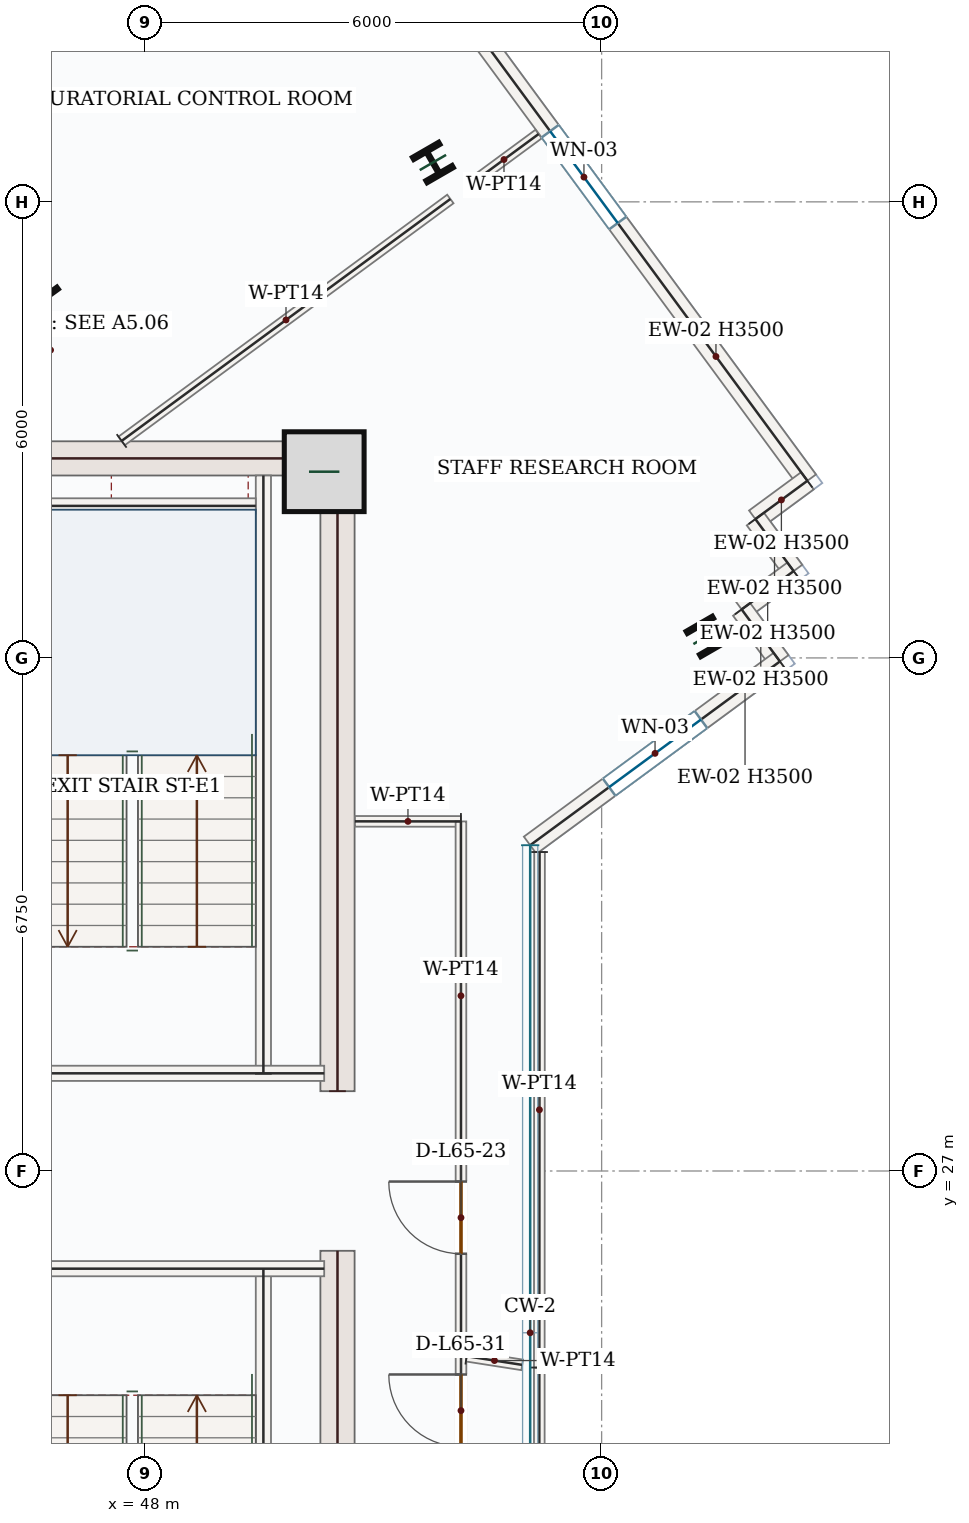
"""IFC4 building model, lengths in metres.
Left out: names, types, materials, properties, quantities, classifications, styles, units other than length and angle.
Written with IfcOpenShell. Run it as: python <this file> out.ifc"""

import sys

from ifc_helpers import new_model, si_unit, direction, frame, frame_2d, origin, origin_2d, place, context, subcontext, project, spatial, rectangle, i_section, extrude, source, transform, mapped, element, fill, save


model = new_model("IFC4")
c1 = context("Model", 3, precision=1e-05, world=origin(), true_north=direction((0.0, 1.0)))
c2 = subcontext(c1, "Body", "Model", "MODEL_VIEW")
j1 = project(units=[si_unit("LENGTHUNIT", "METRE"), si_unit("PLANEANGLEUNIT", "RADIAN")], contexts=[c1])
p1 = place(None, origin())
s1 = spatial("IfcSite", under=j1, at=p1, CompositionType="ELEMENT")
p2 = place(p1, origin())
s2 = spatial("IfcBuilding", under=s1, at=p2, CompositionType="ELEMENT")
p3 = place(p2, frame((0.0, 0.0, 272.85)))
s3 = spatial("IfcBuildingStorey", under=s2, at=p3, CompositionType="ELEMENT", Elevation=272.85)
m1 = source(origin(), c2, "Body", "SweptSolid", [
    extrude(rectangle(XDim=8.55, YDim=0.45, at=frame_2d((4.275, 0.0))), origin(), (0.0, 0.0, 1.0), 3.5),
])
for number, where, z_axis, x_axis in (
    (1, (50.525, 17.4, 0.0), (0.0, 0.0, 1.0), (0.0, 1.0, 0.0)),
    (2, (50.525, 28.05, 0.0), (0.0, 0.0, 1.0), (0.0, 1.0, 0.0)),
):
    element("IfcWall", number, at=place(p3, frame(where, z_axis=z_axis, x_axis=x_axis)), inside=s3, PredefinedType="SHEAR", context=c2, shape_type="MappedRepresentation", body=[
        mapped(m1, transform((0.0, 0.0, 0.0), x_axis=(1.0, 0.0, 0.0), y_axis=(0.0, 1.0, 0.0), z_axis=(0.0, 0.0, 1.0), scale=1.0)),
    ])
m2 = source(origin(), c2, "Body", "SweptSolid", [
    extrude(rectangle(XDim=7.1, YDim=0.45, at=frame_2d((3.55, 0.0))), origin(), (0.0, 0.0, 1.0), 3.5),
])
p4 = place(p3, frame((43.2, 36.375, 0.0), z_axis=(0.0, 0.0, 1.0), x_axis=(1.0, 0.0, 0.0)))
e3 = element("IfcWall", 3, at=p4, inside=s3, PredefinedType="SHEAR", context=c2, shape_type="MappedRepresentation", body=[
    mapped(m2, transform((0.0, 0.0, 0.0), x_axis=(1.0, 0.0, 0.0), y_axis=(0.0, 1.0, 0.0), z_axis=(0.0, 0.0, 1.0), scale=1.0)),
])
m3 = source(origin(), c2, "Body", "SweptSolid", [
    extrude(rectangle(XDim=1.05, YDim=1.05, at=origin_2d()), origin(), (0.0, 0.0, 1.0), 3.75),
])
p5 = place(p3, frame((50.35, 36.2, 0.0), z_axis=(0.0, 0.0, 1.0), x_axis=(1.0, 0.0, 0.0)))
e4 = element("IfcColumn", 4, at=p5, inside=s3, PredefinedType="COLUMN", context=c2, shape_type="MappedRepresentation", body=[
    mapped(m3, transform((0.0, 0.0, 0.0), x_axis=(1.0, 0.0, 0.0), y_axis=(0.0, 1.0, 0.0), z_axis=(0.0, 0.0, 1.0), scale=1.0)),
])
m4 = source(origin(), c2, "Body", "SweptSolid", [
    extrude(i_section(OverallWidth=0.399, OverallDepth=0.386, WebThickness=0.021, FlangeThickness=0.033, FilletRadius=0.018, at=origin_2d()), origin(), (0.0, 0.0, 1.0), 3.75),
])
for number, where, z_axis, x_axis in (
    (5, (46.578, 38.641, 0.0), (0.0, 0.0, 1.0), (0.809, 0.588, 0.0)),
    (6, (55.38, 34.032, 0.0), (0.0, 0.0, 1.0), (0.866, 0.5, 0.0)),
    (7, (51.78, 40.268, 0.0), (0.0, 0.0, 1.0), (0.866, 0.5, 0.0)),
):
    element("IfcColumn", number, at=place(p3, frame(where, z_axis=z_axis, x_axis=x_axis)), inside=s3, PredefinedType="COLUMN", context=c2, shape_type="MappedRepresentation", body=[
        mapped(m4, transform((0.0, 0.0, 0.0), x_axis=(1.0, 0.0, 0.0), y_axis=(0.0, 1.0, 0.0), z_axis=(0.0, 0.0, 1.0), scale=1.0)),
    ])
p6 = place(p3, frame((41.423, 39.26, 0.0), z_axis=(0.0, 0.0, 1.0), x_axis=(0.805403112922, 0.592727446383, 0.0)))
e8 = element("IfcWall", 8, at=p6, inside=s3, PredefinedType="SOLIDWALL", context=c2, shape_type="SweptSolid", body=[
    extrude(rectangle(XDim=8.726, YDim=0.28, at=frame_2d((4.363, 0.0))), origin(), (0.0, 0.0, 1.0), 3.5),
])
p7 = place(p6, frame((2.917, 0.0, 0.0)))
e9 = element("IfcOpeningElement", 9, at=p7, cuts=e8, PredefinedType="OPENING", context=c2, shape_type="SweptSolid", body=[
    extrude(rectangle(XDim=1.05, YDim=2.15, at=frame_2d((0.525, 1.075))), frame((0.0, 0.15, 0.0), z_axis=(0.0, -1.0, 0.0), x_axis=(1.0, 0.0, 0.0)), (0.0, 0.0, 1.0), 0.3),
])
p8 = place(p3, frame((50.827, 44.07, 0.0), z_axis=(0.0, 0.0, 1.0), x_axis=(0.592722097771, -0.805407049146, 0.0)))
e10 = element("IfcWall", 10, at=p8, inside=s3, PredefinedType="SOLIDWALL", context=c2, shape_type="SweptSolid", body=[
    extrude(rectangle(XDim=9.92, YDim=0.28, at=frame_2d((4.96, 0.0))), origin(), (0.0, 0.0, 1.0), 3.5),
])
p9 = place(p8, frame((4.21, 0.0, 0.85)))
e11 = element("IfcOpeningElement", 11, at=p9, cuts=e10, PredefinedType="OPENING", context=c2, shape_type="SweptSolid", body=[
    extrude(rectangle(XDim=1.5, YDim=1.5, at=frame_2d((0.75, 0.75))), frame((0.0, 0.15, 0.0), z_axis=(0.0, -1.0, 0.0), x_axis=(1.0, 0.0, 0.0)), (0.0, 0.0, 1.0), 0.3),
])
m5 = source(origin(), c2, "Body", "SweptSolid", [
    extrude(rectangle(XDim=0.85, YDim=0.28, at=frame_2d((0.425, 0.0))), origin(), (0.0, 0.0, 1.0), 3.5),
])
for number, where, z_axis, x_axis in (
    (12, (56.707, 36.081, 0.0), (0.0, 0.0, 1.0), (-0.805, -0.593, 0.0)),
    (13, (56.023, 35.577, 0.0), (0.0, 0.0, 1.0), (0.593, -0.805, 0.0)),
):
    element("IfcWall", number, at=place(p3, frame(where, z_axis=z_axis, x_axis=x_axis)), inside=s3, PredefinedType="SOLIDWALL", context=c2, shape_type="MappedRepresentation", body=[
        mapped(m5, transform((0.0, 0.0, 0.0), x_axis=(1.0, 0.0, 0.0), y_axis=(0.0, 1.0, 0.0), z_axis=(0.0, 0.0, 1.0), scale=1.0)),
    ])
m6 = source(origin(), c2, "Body", "SweptSolid", [
    extrude(rectangle(XDim=0.85, YDim=0.28, at=frame_2d((0.425, 0.0))), origin(), (0.0, 0.0, 1.0), 3.5),
])
p10 = place(p3, frame((56.527, 34.892, 0.0), z_axis=(0.0, 0.0, 1.0), x_axis=(-0.805445398986, -0.592669983425, 0.0)))
e14 = element("IfcWall", 14, at=p10, inside=s3, PredefinedType="SOLIDWALL", context=c2, shape_type="MappedRepresentation", body=[
    mapped(m6, transform((0.0, 0.0, 0.0), x_axis=(1.0, 0.0, 0.0), y_axis=(0.0, 1.0, 0.0), z_axis=(0.0, 0.0, 1.0), scale=1.0)),
])
p11 = place(p3, frame((55.842, 34.388, 0.0), z_axis=(0.0, 0.0, 1.0), x_axis=(0.592807079659, -0.80534450163, 0.0)))
e15 = element("IfcWall", 15, at=p11, inside=s3, PredefinedType="SOLIDWALL", context=c2, shape_type="MappedRepresentation", body=[
    mapped(m5, transform((0.0, 0.0, 0.0), x_axis=(1.0, 0.0, 0.0), y_axis=(0.0, 1.0, 0.0), z_axis=(0.0, 0.0, 1.0), scale=1.0)),
])
p12 = place(p3, frame((56.346, 33.704, 0.0), z_axis=(0.0, 0.0, 1.0), x_axis=(-0.805410687764, -0.592717153486, 0.0)))
e16 = element("IfcWall", 16, at=p12, inside=s3, PredefinedType="SOLIDWALL", context=c2, shape_type="SweptSolid", body=[
    extrude(rectangle(XDim=4.079, YDim=0.28, at=frame_2d((2.04, 0.0))), origin(), (0.0, 0.0, 1.0), 3.5),
])
p13 = place(p12, frame((1.29, 0.0, 0.85)))
e17 = element("IfcOpeningElement", 17, at=p13, cuts=e16, PredefinedType="OPENING", context=c2, shape_type="SweptSolid", body=[
    extrude(rectangle(XDim=1.5, YDim=1.5, at=frame_2d((0.75, 0.75))), frame((0.0, 0.15, 0.0), z_axis=(0.0, -1.0, 0.0), x_axis=(1.0, 0.0, 0.0)), (0.0, 0.0, 1.0), 0.3),
])
m7 = source(origin(), c2, "Body", "SweptSolid", [
    extrude(rectangle(XDim=7.87, YDim=0.2, at=frame_2d((3.935, 0.0))), origin(), (0.0, 0.0, 1.0), 3.5),
])
for number, where, z_axis, x_axis in (
    (18, (49.55, 17.85, 0.0), (0.0, 0.0, 1.0), (0.0, 1.0, 0.0)),
    (19, (49.55, 28.28, 0.0), (0.0, 0.0, 1.0), (0.0, 1.0, 0.0)),
):
    element("IfcWall", number, at=place(p3, frame(where, z_axis=z_axis, x_axis=x_axis)), inside=s3, PredefinedType="SOLIDWALL", context=c2, shape_type="MappedRepresentation", body=[
        mapped(m7, transform((0.0, 0.0, 0.0), x_axis=(1.0, 0.0, 0.0), y_axis=(0.0, 1.0, 0.0), z_axis=(0.0, 0.0, 1.0), scale=1.0)),
    ])
m8 = source(origin(), c2, "Body", "SweptSolid", [
    extrude(rectangle(XDim=4.25, YDim=0.2, at=frame_2d((2.125, 0.0))), origin(), (0.0, 0.0, 1.0), 3.5),
])
for number, where, z_axis, x_axis in (
    (20, (46.1, 25.715, 0.0), (0.0, 0.0, 1.0), (1.0, 0.0, 0.0)),
    (21, (46.1, 28.285, 0.0), (0.0, 0.0, 1.0), (1.0, 0.0, 0.0)),
):
    element("IfcWall", number, at=place(p3, frame(where, z_axis=z_axis, x_axis=x_axis)), inside=s3, PredefinedType="SOLIDWALL", context=c2, shape_type="MappedRepresentation", body=[
        mapped(m8, transform((0.0, 0.0, 0.0), x_axis=(1.0, 0.0, 0.0), y_axis=(0.0, 1.0, 0.0), z_axis=(0.0, 0.0, 1.0), scale=1.0)),
    ])
m9 = source(origin(), c2, "Body", "SweptSolid", [
    extrude(rectangle(XDim=3.25, YDim=0.2, at=frame_2d((1.625, 0.0))), origin(), (0.0, 0.0, 1.0), 3.5),
])
p14 = place(p3, frame((46.2, 35.75, 0.0), z_axis=(0.0, 0.0, 1.0), x_axis=(1.0, 0.0, 0.0)))
e22 = element("IfcWall", 22, at=p14, inside=s3, PredefinedType="SOLIDWALL", context=c2, shape_type="MappedRepresentation", body=[
    mapped(m9, transform((0.0, 0.0, 0.0), x_axis=(1.0, 0.0, 0.0), y_axis=(0.0, 1.0, 0.0), z_axis=(0.0, 0.0, 1.0), scale=1.0)),
])
p15 = place(p3, frame((52.149, 22.478, 0.0), z_axis=(0.0, 0.0, 1.0), x_axis=(0.000465766135, 0.999999891531, 0.0)))
e23 = element("IfcWall", 23, at=p15, inside=s3, PredefinedType="PARTITIONING", context=c2, shape_type="SweptSolid", body=[
    extrude(rectangle(XDim=2.097, YDim=0.14, at=frame_2d((1.048, 0.0))), origin(), (0.0, 0.0, 1.0), 3.5),
])
p16 = place(p15, frame((0.894, 0.0, 0.0)))
e24 = element("IfcOpeningElement", 24, at=p16, cuts=e23, PredefinedType="OPENING", context=c2, shape_type="SweptSolid", body=[
    extrude(rectangle(XDim=0.95, YDim=2.15, at=frame_2d((0.475, 1.075))), frame((0.0, 0.08, 0.0), z_axis=(0.0, -1.0, 0.0), x_axis=(1.0, 0.0, 0.0)), (0.0, 0.0, 1.0), 0.16),
])
m10 = source(origin(), c2, "Body", "SweptSolid", [
    extrude(rectangle(XDim=0.739, YDim=0.14, at=frame_2d((0.369, 0.0))), origin(), (0.0, 0.0, 1.0), 3.5),
])
p17 = place(p3, frame((52.225, 24.563, 0.0), z_axis=(0.0, 0.0, 1.0), x_axis=(0.988021482099, -0.154316398709, 0.0)))
e25 = element("IfcWall", 25, at=p17, inside=s3, PredefinedType="PARTITIONING", context=c2, shape_type="MappedRepresentation", body=[
    mapped(m10, transform((0.0, 0.0, 0.0), x_axis=(1.0, 0.0, 0.0), y_axis=(0.0, 1.0, 0.0), z_axis=(0.0, 0.0, 1.0), scale=1.0)),
])
m11 = source(origin(), c2, "Body", "SweptSolid", [
    extrude(rectangle(XDim=6.006, YDim=0.14, at=frame_2d((3.003, 0.0))), origin(), (0.0, 0.0, 1.0), 3.5),
])
p18 = place(p3, frame((53.18, 24.414, 0.0), z_axis=(0.0, 0.0, 1.0), x_axis=(0.0, -1.0, 0.0)))
e26 = element("IfcWall", 26, at=p18, inside=s3, PredefinedType="PARTITIONING", context=c2, shape_type="MappedRepresentation", body=[
    mapped(m11, transform((0.0, 0.0, 0.0), x_axis=(1.0, 0.0, 0.0), y_axis=(0.0, 1.0, 0.0), z_axis=(0.0, 0.0, 1.0), scale=1.0)),
])
m12 = source(origin(), c2, "Body", "SweptSolid", [
    extrude(rectangle(XDim=1.394, YDim=0.14, at=frame_2d((0.697, 0.0))), origin(), (0.0, 0.0, 1.0), 3.5),
])
p19 = place(p3, frame((52.149, 31.599, 0.0), z_axis=(0.0, 0.0, 1.0), x_axis=(-0.999999754632, 0.000700525222, 0.0)))
e27 = element("IfcWall", 27, at=p19, inside=s3, PredefinedType="PARTITIONING", context=c2, shape_type="MappedRepresentation", body=[
    mapped(m12, transform((0.0, 0.0, 0.0), x_axis=(1.0, 0.0, 0.0), y_axis=(0.0, 1.0, 0.0), z_axis=(0.0, 0.0, 1.0), scale=1.0)),
])
m13 = source(origin(), c2, "Body", "SweptSolid", [
    extrude(rectangle(XDim=5.37, YDim=0.14, at=frame_2d((2.685, 0.0))), origin(), (0.0, 0.0, 1.0), 3.5),
])
p20 = place(p3, frame((47.685, 36.605, 0.0), z_axis=(0.0, 0.0, 1.0), x_axis=(0.805412248971, 0.592715032041, 0.0)))
e28 = element("IfcWall", 28, at=p20, inside=s3, PredefinedType="PARTITIONING", context=c2, shape_type="MappedRepresentation", body=[
    mapped(m13, transform((0.0, 0.0, 0.0), x_axis=(1.0, 0.0, 0.0), y_axis=(0.0, 1.0, 0.0), z_axis=(0.0, 0.0, 1.0), scale=1.0)),
])
m14 = source(origin(), c2, "Body", "SweptSolid", [
    extrude(rectangle(XDim=1.13, YDim=0.14, at=frame_2d((0.565, 0.0))), origin(), (0.0, 0.0, 1.0), 3.5),
])
p21 = place(p3, frame((52.26, 39.972, 0.0), z_axis=(0.0, 0.0, 1.0), x_axis=(0.805359802525, 0.592786292416, 0.0)))
e29 = element("IfcWall", 29, at=p21, inside=s3, PredefinedType="PARTITIONING", context=c2, shape_type="MappedRepresentation", body=[
    mapped(m14, transform((0.0, 0.0, 0.0), x_axis=(1.0, 0.0, 0.0), y_axis=(0.0, 1.0, 0.0), z_axis=(0.0, 0.0, 1.0), scale=1.0)),
])
m15 = source(origin(), c2, "Body", "SweptSolid", [
    extrude(rectangle(XDim=6.782, YDim=0.14, at=frame_2d((3.391, 0.0))), origin(), (0.0, 0.0, 1.0), 3.5),
])
p22 = place(p3, frame((53.183, 31.196, 0.0), z_axis=(0.0, 0.0, 1.0), x_axis=(-0.000467979358, -0.999999890498, 0.0)))
e30 = element("IfcWall", 30, at=p22, inside=s3, PredefinedType="PARTITIONING", context=c2, shape_type="MappedRepresentation", body=[
    mapped(m15, transform((0.0, 0.0, 0.0), x_axis=(1.0, 0.0, 0.0), y_axis=(0.0, 1.0, 0.0), z_axis=(0.0, 0.0, 1.0), scale=1.0)),
])
p23 = place(p3, frame((52.15, 24.575, 0.0), z_axis=(0.0, 0.0, 1.0), x_axis=(-0.000139028882, 0.999999990335, 0.0)))
e31 = element("IfcWall", 31, at=p23, inside=s3, PredefinedType="PARTITIONING", context=c2, shape_type="SweptSolid", body=[
    extrude(rectangle(XDim=7.024, YDim=0.14, at=frame_2d((3.512, 0.0))), origin(), (0.0, 0.0, 1.0), 3.5),
])
p24 = place(p23, frame((1.336, 0.0, 0.0)))
e32 = element("IfcOpeningElement", 32, at=p24, cuts=e31, PredefinedType="OPENING", context=c2, shape_type="SweptSolid", body=[
    extrude(rectangle(XDim=0.95, YDim=2.15, at=frame_2d((0.475, 1.075))), frame((0.0, 0.08, 0.0), z_axis=(0.0, -1.0, 0.0), x_axis=(1.0, 0.0, 0.0)), (0.0, 0.0, 1.0), 0.16),
])
m16 = source(origin(), c2, "Body", "SweptSolid", [
    extrude(rectangle(XDim=1.5, YDim=1.5, at=frame_2d((0.75, 0.75))), frame((0.0, 0.03, 0.0), z_axis=(0.0, -1.0, 0.0), x_axis=(1.0, 0.0, 0.0)), (0.0, 0.0, 1.0), 0.06),
])
p25 = place(p9, origin())
e33 = element("IfcWindow", 33, at=p25, inside=s3, PartitioningType="SINGLE_PANEL", PredefinedType="WINDOW", context=c2, shape_type="MappedRepresentation", body=[
    mapped(m16, transform((0.0, 0.0, 0.0), x_axis=(1.0, 0.0, 0.0), y_axis=(0.0, 1.0, 0.0), z_axis=(0.0, 0.0, 1.0), scale=1.0)),
])
fill(e11, e33)
p26 = place(p13, origin())
e34 = element("IfcWindow", 34, at=p26, inside=s3, PartitioningType="SINGLE_PANEL", PredefinedType="WINDOW", context=c2, shape_type="MappedRepresentation", body=[
    mapped(m16, transform((0.0, 0.0, 0.0), x_axis=(1.0, 0.0, 0.0), y_axis=(0.0, 1.0, 0.0), z_axis=(0.0, 0.0, 1.0), scale=1.0)),
])
fill(e17, e34)
m17 = source(origin(), c2, "Body", "SweptSolid", [
    extrude(rectangle(XDim=0.95, YDim=2.15, at=frame_2d((0.475, 1.075))), frame((0.0, 0.025, 0.0), z_axis=(0.0, -1.0, 0.0), x_axis=(1.0, 0.0, 0.0)), (0.0, 0.0, 1.0), 0.05),
])
p27 = place(p24, origin())
e35 = element("IfcDoor", 35, at=p27, inside=s3, OperationType="SINGLE_SWING_RIGHT", PredefinedType="DOOR", context=c2, shape_type="MappedRepresentation", body=[
    mapped(m17, transform((0.0, 0.0, 0.0), x_axis=(1.0, 0.0, 0.0), y_axis=(0.0, 1.0, 0.0), z_axis=(0.0, 0.0, 1.0), scale=1.0)),
])
fill(e32, e35)
p28 = place(p16, origin())
e36 = element("IfcDoor", 36, at=p28, inside=s3, OperationType="SINGLE_SWING_RIGHT", PredefinedType="DOOR", context=c2, shape_type="MappedRepresentation", body=[
    mapped(m17, transform((0.0, 0.0, 0.0), x_axis=(1.0, 0.0, 0.0), y_axis=(0.0, 1.0, 0.0), z_axis=(0.0, 0.0, 1.0), scale=1.0)),
])
fill(e24, e36)
save(model, sys.argv[1])
